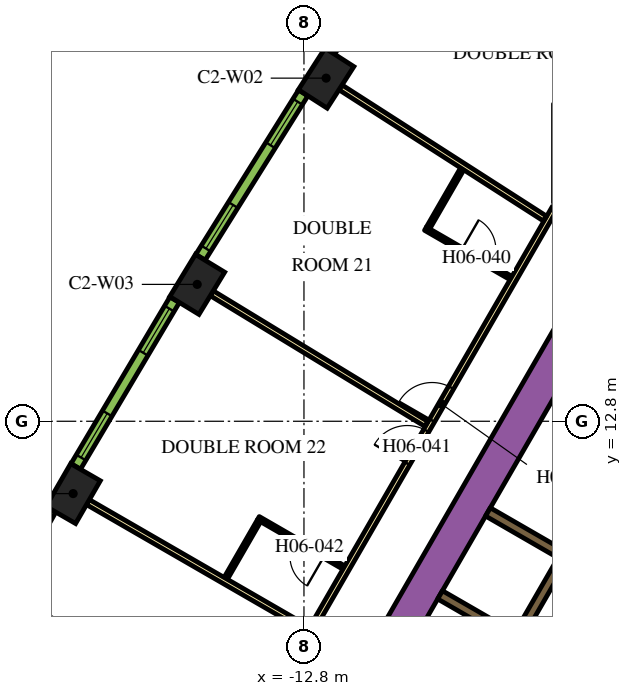
"""IFC4 building model, lengths in metres.
Left out: names, types, materials, properties, quantities, classifications, styles, units other than length and angle.
Written with IfcOpenShell. Run it as: python <this file> out.ifc"""

import sys

from ifc_helpers import new_model, si_unit, direction, frame, frame_2d, origin, origin_2d, place, context, subcontext, project, spatial, rectangle, extrude, element, fill, save


model = new_model("IFC4")
c1 = context("Model", 3, precision=1e-05, world=origin(), true_north=direction((0.0, 1.0)))
c2 = subcontext(c1, "Body", "Model", "MODEL_VIEW")
j1 = project(units=[si_unit("LENGTHUNIT", "METRE"), si_unit("PLANEANGLEUNIT", "RADIAN")], contexts=[c1])
p1 = place(None, origin())
s1 = spatial("IfcSite", under=j1, at=p1, CompositionType="ELEMENT")
p2 = place(p1, origin())
s2 = spatial("IfcBuilding", under=s1, at=p2, CompositionType="ELEMENT")
p3 = place(p2, frame((0.0, 0.0, 91.5)))
s3 = spatial("IfcBuildingStorey", under=s2, at=p3, CompositionType="ELEMENT", Elevation=91.5)
for number, where, z_axis, x_axis in (
    (1, (-12.217, 21.828, 0.0), (0.0, 0.0, 1.0), (-0.54, -0.842, 0.0)),
    (2, (-15.609, 16.402, 0.0), (0.0, 0.0, 1.0), (-0.52, -0.854, 0.0)),
    (3, (-18.874, 10.897, 0.0), (0.0, 0.0, 1.0), (-0.5, -0.866, 0.0)),
):
    element("IfcColumn", number, at=place(p3, frame(where, z_axis=z_axis, x_axis=x_axis)), inside=s3, PredefinedType="COLUMN", context=c2, shape_type="SweptSolid", body=[
        extrude(rectangle(XDim=1.3, YDim=0.9, at=origin_2d()), origin(), (0.0, 0.0, 1.0), 3.9),
    ])
p4 = place(p3, frame((-15.36, -1.503, 0.0), z_axis=(0.0, 0.0, 1.0), x_axis=(0.50000389221, 0.866023156604, 0.0)))
e4 = element("IfcWall", 4, at=p4, inside=s3, PredefinedType="SOLIDWALL", context=c2, shape_type="SweptSolid", body=[
    extrude(rectangle(XDim=21.0, YDim=0.9, at=frame_2d((10.5, 0.0))), origin(), (0.0, 0.0, 1.0), 3.9),
])
p5 = place(p3, frame((-8.06, -1.311, 0.0), z_axis=(0.0, 0.0, 1.0), x_axis=(0.50000273126, 0.866023826885, 0.0)))
e5 = element("IfcWall", 5, at=p5, inside=s3, PredefinedType="SOLIDWALL", context=c2, shape_type="SweptSolid", body=[
    extrude(rectangle(XDim=10.33, YDim=0.25, at=frame_2d((5.165, 0.0))), origin(), (0.0, 0.0, 1.0), 3.9),
])
p6 = place(p3, frame((-7.314, 7.132, 0.0), z_axis=(0.0, 0.0, 1.0), x_axis=(-0.866008176907, 0.50002983664, 0.0)))
e6 = element("IfcWall", 6, at=p6, inside=s3, PredefinedType="SOLIDWALL", context=c2, shape_type="SweptSolid", body=[
    extrude(rectangle(XDim=2.2, YDim=0.25, at=frame_2d((1.1, 0.0))), origin(), (0.0, 0.0, 1.0), 3.9),
])
p7 = place(p3, frame((-7.959, 10.415, 0.0), z_axis=(0.0, 0.0, 1.0), x_axis=(0.866020958405, -0.500007699544, 0.0)))
e7 = element("IfcWall", 7, at=p7, inside=s3, PredefinedType="SOLIDWALL", context=c2, shape_type="SweptSolid", body=[
    extrude(rectangle(XDim=4.1, YDim=0.25, at=frame_2d((2.05, 0.0))), origin(), (0.0, 0.0, 1.0), 3.9),
])
p8 = place(p3, frame((-6.008, 9.144, 0.0), z_axis=(0.0, 0.0, 1.0), x_axis=(-0.500006956611, -0.866021387346, 0.0)))
e8 = element("IfcWall", 8, at=p8, inside=s3, PredefinedType="SOLIDWALL", context=c2, shape_type="SweptSolid", body=[
    extrude(rectangle(XDim=9.83, YDim=0.25, at=frame_2d((4.915, 0.0))), origin(), (0.0, 0.0, 1.0), 3.9),
])
p9 = place(p8, frame((6.985, 0.0, 0.0)))
e9 = element("IfcOpeningElement", 9, at=p9, cuts=e8, PredefinedType="OPENING", context=c2, shape_type="SweptSolid", body=[
    extrude(rectangle(XDim=0.9, YDim=2.1, at=frame_2d((0.45, 1.05))), frame((0.0, 0.135, 0.0), z_axis=(0.0, -1.0, 0.0), x_axis=(1.0, 0.0, 0.0)), (0.0, 0.0, 1.0), 0.27),
])
p10 = place(p3, frame((-19.081, -3.9, 0.0), z_axis=(0.0, 0.0, 1.0), x_axis=(0.499998313975, 0.866026377209, 0.0)))
e10 = element("IfcWall", 10, at=p10, inside=s3, PredefinedType="PARTITIONING", context=c2, shape_type="SweptSolid", body=[
    extrude(rectangle(XDim=25.766, YDim=0.15, at=frame_2d((12.883, 0.0))), origin(), (0.0, 0.0, 1.0), 2.75),
])
p11 = place(p10, frame((19.306, 0.0, 0.0)))
e11 = element("IfcOpeningElement", 11, at=p11, cuts=e10, PredefinedType="OPENING", context=c2, shape_type="SweptSolid", body=[
    extrude(rectangle(XDim=1.0, YDim=2.1, at=frame_2d((0.5, 1.05))), frame((0.0, 0.085, 0.0), z_axis=(0.0, -1.0, 0.0), x_axis=(1.0, 0.0, 0.0)), (0.0, 0.0, 1.0), 0.17),
])
p12 = place(p10, frame((18.0, 0.0, 0.0)))
e12 = element("IfcOpeningElement", 12, at=p12, cuts=e10, PredefinedType="OPENING", context=c2, shape_type="SweptSolid", body=[
    extrude(rectangle(XDim=1.0, YDim=2.1, at=frame_2d((0.5, 1.05))), frame((0.0, 0.085, 0.0), z_axis=(0.0, -1.0, 0.0), x_axis=(1.0, 0.0, 0.0)), (0.0, 0.0, 1.0), 0.17),
])
p13 = place(p10, frame((10.874, 0.0, 0.0)))
e13 = element("IfcOpeningElement", 13, at=p13, cuts=e10, PredefinedType="OPENING", context=c2, shape_type="SweptSolid", body=[
    extrude(rectangle(XDim=0.9, YDim=2.1, at=frame_2d((0.45, 1.05))), frame((0.0, 0.085, 0.0), z_axis=(0.0, -1.0, 0.0), x_axis=(1.0, 0.0, 0.0)), (0.0, 0.0, 1.0), 0.17),
])
p14 = place(p10, frame((8.548, 0.0, 0.0)))
e14 = element("IfcOpeningElement", 14, at=p14, cuts=e10, PredefinedType="OPENING", context=c2, shape_type="SweptSolid", body=[
    extrude(rectangle(XDim=1.1, YDim=2.1, at=frame_2d((0.55, 1.05))), frame((0.0, 0.085, 0.0), z_axis=(0.0, -1.0, 0.0), x_axis=(1.0, 0.0, 0.0)), (0.0, 0.0, 1.0), 0.17),
])
p15 = place(p10, frame((0.18, 0.0, 0.0)))
e15 = element("IfcOpeningElement", 15, at=p15, cuts=e10, PredefinedType="OPENING", context=c2, shape_type="SweptSolid", body=[
    extrude(rectangle(XDim=1.0, YDim=2.1, at=frame_2d((0.5, 1.05))), frame((0.0, 0.085, 0.0), z_axis=(0.0, -1.0, 0.0), x_axis=(1.0, 0.0, 0.0)), (0.0, 0.0, 1.0), 0.17),
])
p16 = place(p3, frame((-20.581, 8.185, 0.0), z_axis=(0.0, 0.0, 1.0), x_axis=(0.871820720803, -0.489825102233, 0.0)))
e16 = element("IfcWall", 16, at=p16, inside=s3, PredefinedType="PARTITIONING", context=c2, shape_type="SweptSolid", body=[
    extrude(rectangle(XDim=7.257, YDim=0.15, at=frame_2d((3.628, 0.0))), origin(), (0.0, 0.0, 1.0), 2.75),
])
p17 = place(p3, frame((-18.484, 10.672, 0.0), z_axis=(0.0, 0.0, 1.0), x_axis=(0.866019162053, -0.50001081084, 0.0)))
e17 = element("IfcWall", 17, at=p17, inside=s3, PredefinedType="PARTITIONING", context=c2, shape_type="SweptSolid", body=[
    extrude(rectangle(XDim=6.694, YDim=0.15, at=frame_2d((3.347, 0.0))), origin(), (0.0, 0.0, 1.0), 2.75),
])
p18 = place(p3, frame((-15.225, 16.167, 0.0), z_axis=(0.0, 0.0, 1.0), x_axis=(0.854088713274, -0.520127359266, 0.0)))
e18 = element("IfcWall", 18, at=p18, inside=s3, PredefinedType="PARTITIONING", context=c2, shape_type="SweptSolid", body=[
    extrude(rectangle(XDim=6.611, YDim=0.15, at=frame_2d((3.305, 0.0))), origin(), (0.0, 0.0, 1.0), 2.75),
])
p19 = place(p3, frame((-11.838, 21.585, 0.0), z_axis=(0.0, 0.0, 1.0), x_axis=(0.841699322813, -0.539946525108, 0.0)))
e19 = element("IfcWall", 19, at=p19, inside=s3, PredefinedType="PARTITIONING", context=c2, shape_type="SweptSolid", body=[
    extrude(rectangle(XDim=6.392, YDim=0.15, at=frame_2d((3.196, 0.0))), origin(), (0.0, 0.0, 1.0), 2.75),
])
p20 = place(p3, frame((-8.326, 26.923, 0.0), z_axis=(0.0, 0.0, 1.0), x_axis=(0.828836601893, -0.5594907393, 0.0)))
e20 = element("IfcWall", 20, at=p20, inside=s3, PredefinedType="PARTITIONING", context=c2, shape_type="SweptSolid", body=[
    extrude(rectangle(XDim=8.909, YDim=0.15, at=frame_2d((4.455, 0.0))), origin(), (0.0, 0.0, 1.0), 2.75),
])
p21 = place(p3, frame((-9.603, 17.868, 0.0), z_axis=(0.0, 0.0, 1.0), x_axis=(0.866021400173, -0.500006934395, 0.0)))
e21 = element("IfcWall", 21, at=p21, inside=s3, PredefinedType="PARTITIONING", context=c2, shape_type="SweptSolid", body=[
    extrude(rectangle(XDim=2.6, YDim=0.1, at=frame_2d((1.3, 0.0))), origin(), (0.0, 0.0, 1.0), 2.75),
])
p22 = place(p21, frame((1.1, 0.0, 0.0)))
e22 = element("IfcOpeningElement", 22, at=p22, cuts=e21, PredefinedType="OPENING", context=c2, shape_type="SweptSolid", body=[
    extrude(rectangle(XDim=0.9, YDim=2.1, at=frame_2d((0.45, 1.05))), frame((0.0, 0.06, 0.0), z_axis=(0.0, -1.0, 0.0), x_axis=(1.0, 0.0, 0.0)), (0.0, 0.0, 1.0), 0.12),
])
p23 = place(p3, frame((-9.534, 17.886, 0.0), z_axis=(0.0, 0.0, 1.0), x_axis=(0.500041240653, 0.866001592173, 0.0)))
e23 = element("IfcWall", 23, at=p23, inside=s3, PredefinedType="PARTITIONING", context=c2, shape_type="SweptSolid", body=[
    extrude(rectangle(XDim=1.79, YDim=0.1, at=frame_2d((0.895, 0.0))), origin(), (0.0, 0.0, 1.0), 2.75),
])
p24 = place(p3, frame((-11.75, 8.949, 0.0), z_axis=(0.0, 0.0, 1.0), x_axis=(-0.865997922154, 0.500047596559, 0.0)))
e24 = element("IfcWall", 24, at=p24, inside=s3, PredefinedType="PARTITIONING", context=c2, shape_type="SweptSolid", body=[
    extrude(rectangle(XDim=2.6, YDim=0.1, at=frame_2d((1.3, 0.0))), origin(), (0.0, 0.0, 1.0), 2.75),
])
p25 = place(p24, frame((0.6, 0.0, 0.0)))
e25 = element("IfcOpeningElement", 25, at=p25, cuts=e24, PredefinedType="OPENING", context=c2, shape_type="SweptSolid", body=[
    extrude(rectangle(XDim=0.9, YDim=2.1, at=frame_2d((0.45, 1.05))), frame((0.0, 0.06, 0.0), z_axis=(0.0, -1.0, 0.0), x_axis=(1.0, 0.0, 0.0)), (0.0, 0.0, 1.0), 0.12),
])
p26 = place(p3, frame((-13.983, 10.181, 0.0), z_axis=(0.0, 0.0, 1.0), x_axis=(-0.499980071345, -0.866036909293, 0.0)))
e26 = element("IfcWall", 26, at=p26, inside=s3, PredefinedType="PARTITIONING", context=c2, shape_type="SweptSolid", body=[
    extrude(rectangle(XDim=1.75, YDim=0.1, at=frame_2d((0.875, 0.0))), origin(), (0.0, 0.0, 1.0), 2.75),
])
p27 = place(p3, frame((-9.311, 26.799, 0.0), z_axis=(0.0, 0.0, 1.0), x_axis=(-0.549741341923, -0.835334937005, 0.0)))
e27 = element("IfcWall", 27, at=p27, inside=s3, PredefinedType="SOLIDWALL", context=c2, shape_type="SweptSolid", body=[
    extrude(rectangle(XDim=5.1, YDim=0.29, at=frame_2d((2.55, 0.0))), origin(), (0.0, 0.0, 1.0), 3.65),
])
p28 = place(p27, frame((0.273, 0.0, 0.9)))
e28 = element("IfcOpeningElement", 28, at=p28, cuts=e27, PredefinedType="OPENING", context=c2, shape_type="SweptSolid", body=[
    extrude(rectangle(XDim=1.35, YDim=2.15, at=frame_2d((0.675, 1.075))), frame((0.0, 0.155, 0.0), z_axis=(0.0, -1.0, 0.0), x_axis=(1.0, 0.0, 0.0)), (0.0, 0.0, 1.0), 0.31),
])
p29 = place(p27, frame((3.478, 0.0, 0.9)))
e29 = element("IfcOpeningElement", 29, at=p29, cuts=e27, PredefinedType="OPENING", context=c2, shape_type="SweptSolid", body=[
    extrude(rectangle(XDim=1.35, YDim=2.15, at=frame_2d((0.675, 1.075))), frame((0.0, 0.155, 0.0), z_axis=(0.0, -1.0, 0.0), x_axis=(1.0, 0.0, 0.0)), (0.0, 0.0, 1.0), 0.31),
])
p30 = place(p3, frame((-12.82, 21.439, 0.0), z_axis=(0.0, 0.0, 1.0), x_axis=(-0.530072082134, -0.847952585787, 0.0)))
e30 = element("IfcWall", 30, at=p30, inside=s3, PredefinedType="SOLIDWALL", context=c2, shape_type="SweptSolid", body=[
    extrude(rectangle(XDim=5.1, YDim=0.29, at=frame_2d((2.55, 0.0))), origin(), (0.0, 0.0, 1.0), 3.65),
])
p31 = place(p30, frame((0.273, 0.0, 0.9)))
e31 = element("IfcOpeningElement", 31, at=p31, cuts=e30, PredefinedType="OPENING", context=c2, shape_type="SweptSolid", body=[
    extrude(rectangle(XDim=1.35, YDim=2.15, at=frame_2d((0.675, 1.075))), frame((0.0, 0.155, 0.0), z_axis=(0.0, -1.0, 0.0), x_axis=(1.0, 0.0, 0.0)), (0.0, 0.0, 1.0), 0.31),
])
p32 = place(p30, frame((3.478, 0.0, 0.9)))
e32 = element("IfcOpeningElement", 32, at=p32, cuts=e30, PredefinedType="OPENING", context=c2, shape_type="SweptSolid", body=[
    extrude(rectangle(XDim=1.35, YDim=2.15, at=frame_2d((0.675, 1.075))), frame((0.0, 0.155, 0.0), z_axis=(0.0, -1.0, 0.0), x_axis=(1.0, 0.0, 0.0)), (0.0, 0.0, 1.0), 0.31),
])
p33 = place(p3, frame((-16.203, 15.998, 0.0), z_axis=(0.0, 0.0, 1.0), x_axis=(-0.510054281659, -0.860142214847, 0.0)))
e33 = element("IfcWall", 33, at=p33, inside=s3, PredefinedType="SOLIDWALL", context=c2, shape_type="SweptSolid", body=[
    extrude(rectangle(XDim=5.101, YDim=0.29, at=frame_2d((2.55, 0.0))), origin(), (0.0, 0.0, 1.0), 3.65),
])
p34 = place(p33, frame((0.273, 0.0, 0.9)))
e34 = element("IfcOpeningElement", 34, at=p34, cuts=e33, PredefinedType="OPENING", context=c2, shape_type="SweptSolid", body=[
    extrude(rectangle(XDim=1.35, YDim=2.15, at=frame_2d((0.675, 1.075))), frame((0.0, 0.155, 0.0), z_axis=(0.0, -1.0, 0.0), x_axis=(1.0, 0.0, 0.0)), (0.0, 0.0, 1.0), 0.31),
])
p35 = place(p33, frame((3.478, 0.0, 0.9)))
e35 = element("IfcOpeningElement", 35, at=p35, cuts=e33, PredefinedType="OPENING", context=c2, shape_type="SweptSolid", body=[
    extrude(rectangle(XDim=1.35, YDim=2.15, at=frame_2d((0.675, 1.075))), frame((0.0, 0.155, 0.0), z_axis=(0.0, -1.0, 0.0), x_axis=(1.0, 0.0, 0.0)), (0.0, 0.0, 1.0), 0.31),
])
p36 = place(p3, frame((-19.458, 10.48, 0.0), z_axis=(0.0, 0.0, 1.0), x_axis=(-0.48983164787, -0.87181704316, 0.0)))
e36 = element("IfcWall", 36, at=p36, inside=s3, PredefinedType="SOLIDWALL", context=c2, shape_type="SweptSolid", body=[
    extrude(rectangle(XDim=5.1, YDim=0.29, at=frame_2d((2.55, 0.0))), origin(), (0.0, 0.0, 1.0), 3.65),
])
p37 = place(p36, frame((0.272, 0.0, 0.9)))
e37 = element("IfcOpeningElement", 37, at=p37, cuts=e36, PredefinedType="OPENING", context=c2, shape_type="SweptSolid", body=[
    extrude(rectangle(XDim=1.35, YDim=2.15, at=frame_2d((0.675, 1.075))), frame((0.0, 0.155, 0.0), z_axis=(0.0, -1.0, 0.0), x_axis=(1.0, 0.0, 0.0)), (0.0, 0.0, 1.0), 0.31),
])
p38 = place(p36, frame((3.478, 0.0, 0.9)))
e38 = element("IfcOpeningElement", 38, at=p38, cuts=e36, PredefinedType="OPENING", context=c2, shape_type="SweptSolid", body=[
    extrude(rectangle(XDim=1.35, YDim=2.15, at=frame_2d((0.675, 1.075))), frame((0.0, 0.155, 0.0), z_axis=(0.0, -1.0, 0.0), x_axis=(1.0, 0.0, 0.0)), (0.0, 0.0, 1.0), 0.31),
])
p39 = place(p11, origin())
e39 = element("IfcDoor", 39, at=p39, inside=s3, OperationType="SINGLE_SWING_LEFT", PredefinedType="DOOR", context=c2, shape_type="SweptSolid", body=[
    extrude(rectangle(XDim=1.0, YDim=2.1, at=frame_2d((0.5, 1.05))), frame((0.0, 0.025, 0.0), z_axis=(0.0, -1.0, 0.0), x_axis=(1.0, 0.0, 0.0)), (0.0, 0.0, 1.0), 0.05),
])
fill(e11, e39)
p40 = place(p22, origin())
e40 = element("IfcDoor", 40, at=p40, inside=s3, OperationType="SINGLE_SWING_RIGHT", PredefinedType="DOOR", context=c2, shape_type="SweptSolid", body=[
    extrude(rectangle(XDim=0.9, YDim=2.1, at=frame_2d((0.45, 1.05))), frame((0.0, 0.025, 0.0), z_axis=(0.0, -1.0, 0.0), x_axis=(1.0, 0.0, 0.0)), (0.0, 0.0, 1.0), 0.05),
])
fill(e22, e40)
p41 = place(p12, origin())
e41 = element("IfcDoor", 41, at=p41, inside=s3, OperationType="SINGLE_SWING_RIGHT", PredefinedType="DOOR", context=c2, shape_type="SweptSolid", body=[
    extrude(rectangle(XDim=1.0, YDim=2.1, at=frame_2d((0.5, 1.05))), frame((0.0, 0.025, 0.0), z_axis=(0.0, -1.0, 0.0), x_axis=(1.0, 0.0, 0.0)), (0.0, 0.0, 1.0), 0.05),
])
fill(e12, e41)
p42 = place(p25, origin())
e42 = element("IfcDoor", 42, at=p42, inside=s3, OperationType="SINGLE_SWING_LEFT", PredefinedType="DOOR", context=c2, shape_type="SweptSolid", body=[
    extrude(rectangle(XDim=0.9, YDim=2.1, at=frame_2d((0.45, 1.05))), frame((0.0, 0.025, 0.0), z_axis=(0.0, -1.0, 0.0), x_axis=(1.0, 0.0, 0.0)), (0.0, 0.0, 1.0), 0.05),
])
fill(e25, e42)
p43 = place(p31, origin())
e43 = element("IfcWindow", 43, at=p43, inside=s3, PartitioningType="DOUBLE_PANEL_VERTICAL", PredefinedType="WINDOW", context=c2, shape_type="SweptSolid", body=[
    extrude(rectangle(XDim=1.35, YDim=2.15, at=frame_2d((0.675, 1.075))), frame((0.0, 0.015, 0.0), z_axis=(0.0, -1.0, 0.0), x_axis=(1.0, 0.0, 0.0)), (0.0, 0.0, 1.0), 0.06),
])
fill(e31, e43)
p44 = place(p32, origin())
e44 = element("IfcWindow", 44, at=p44, inside=s3, PartitioningType="DOUBLE_PANEL_VERTICAL", PredefinedType="WINDOW", context=c2, shape_type="SweptSolid", body=[
    extrude(rectangle(XDim=1.35, YDim=2.15, at=frame_2d((0.675, 1.075))), frame((0.0, 0.015, 0.0), z_axis=(0.0, -1.0, 0.0), x_axis=(1.0, 0.0, 0.0)), (0.0, 0.0, 1.0), 0.06),
])
fill(e32, e44)
p45 = place(p34, origin())
e45 = element("IfcWindow", 45, at=p45, inside=s3, PartitioningType="DOUBLE_PANEL_VERTICAL", PredefinedType="WINDOW", context=c2, shape_type="SweptSolid", body=[
    extrude(rectangle(XDim=1.35, YDim=2.15, at=frame_2d((0.675, 1.075))), frame((0.0, 0.015, 0.0), z_axis=(0.0, -1.0, 0.0), x_axis=(1.0, 0.0, 0.0)), (0.0, 0.0, 1.0), 0.06),
])
fill(e34, e45)
p46 = place(p35, origin())
e46 = element("IfcWindow", 46, at=p46, inside=s3, PartitioningType="DOUBLE_PANEL_VERTICAL", PredefinedType="WINDOW", context=c2, shape_type="SweptSolid", body=[
    extrude(rectangle(XDim=1.35, YDim=2.15, at=frame_2d((0.675, 1.075))), frame((0.0, 0.015, 0.0), z_axis=(0.0, -1.0, 0.0), x_axis=(1.0, 0.0, 0.0)), (0.0, 0.0, 1.0), 0.06),
])
fill(e35, e46)
save(model, sys.argv[1])
